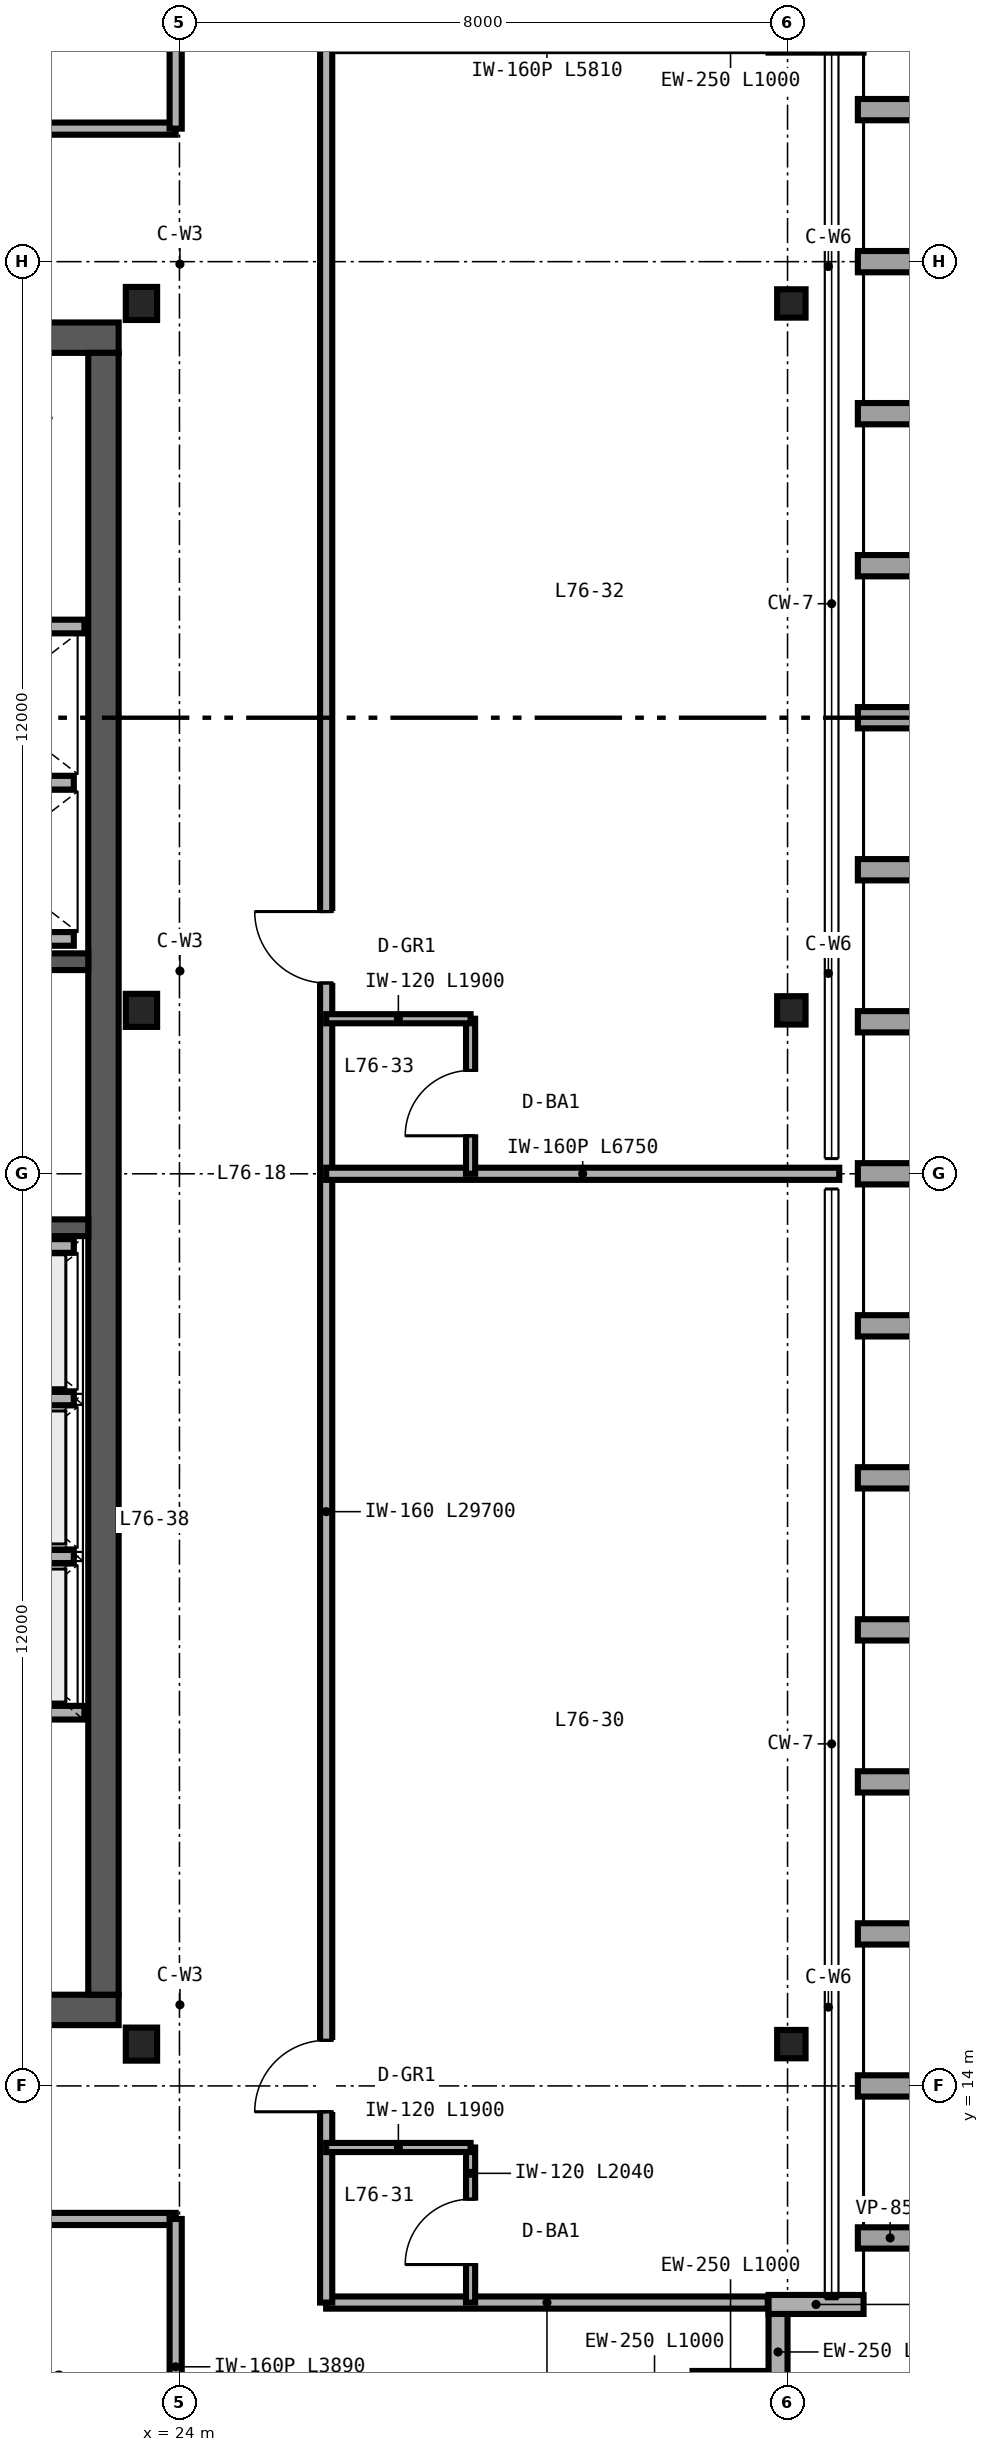
"""IFC4 building model, lengths in metres.
Left out: names, types, materials, properties, quantities, classifications, styles, units other than length and angle.
Written with IfcOpenShell. Run it as: python <this file> out.ifc"""

import sys

from ifc_helpers import new_model, si_unit, direction, frame, frame_2d, origin, origin_2d, place, context, subcontext, project, spatial, rectangle, i_section, extrude, source, transform, mapped, element, fill, save


model = new_model("IFC4")
c1 = context("Model", 3, precision=1e-05, world=origin(), true_north=direction((0.0, 1.0)))
c2 = subcontext(c1, "Body", "Model", "MODEL_VIEW")
j1 = project(units=[si_unit("LENGTHUNIT", "METRE"), si_unit("PLANEANGLEUNIT", "RADIAN")], contexts=[c1])
p1 = place(None, origin())
s1 = spatial("IfcSite", under=j1, at=p1, CompositionType="ELEMENT")
p2 = place(p1, origin())
s2 = spatial("IfcBuilding", under=s1, at=p2, CompositionType="ELEMENT")
p3 = place(p2, frame((0.0, 0.0, 297.6)))
s3 = spatial("IfcBuildingStorey", under=s2, at=p3, CompositionType="ELEMENT", Elevation=297.6)
p4 = place(p3, frame((10.8, 15.0, 0.0), z_axis=(0.0, 0.0, 1.0), x_axis=(1.0, 0.0, 0.0)))
e1 = element("IfcWall", 1, at=p4, inside=s3, PredefinedType="SHEAR", context=c2, shape_type="SweptSolid", body=[
    extrude(rectangle(XDim=12.4, YDim=0.4, at=frame_2d((6.2, 0.0))), origin(), (0.0, 0.0, 1.0), 3.32),
])
p5 = place(p4, frame((10.1, 0.0, 0.0)))
e2 = element("IfcOpeningElement", 2, at=p5, cuts=e1, PredefinedType="OPENING", context=c2, shape_type="SweptSolid", body=[
    extrude(rectangle(XDim=1.0, YDim=2.15, at=frame_2d((0.5, 1.075))), frame((0.0, 0.21, 0.0), z_axis=(0.0, -1.0, 0.0), x_axis=(1.0, 0.0, 0.0)), (0.0, 0.0, 1.0), 0.42),
])
p6 = place(p3, frame((10.8, 37.0, 0.0), z_axis=(0.0, 0.0, 1.0), x_axis=(1.0, 0.0, 0.0)))
e3 = element("IfcWall", 3, at=p6, inside=s3, PredefinedType="SHEAR", context=c2, shape_type="SweptSolid", body=[
    extrude(rectangle(XDim=12.4, YDim=0.4, at=frame_2d((6.2, 0.0))), origin(), (0.0, 0.0, 1.0), 3.32),
])
p7 = place(p6, frame((8.78, 0.0, 0.0)))
e4 = element("IfcOpeningElement", 4, at=p7, cuts=e3, PredefinedType="OPENING", context=c2, shape_type="SweptSolid", body=[
    extrude(rectangle(XDim=1.0, YDim=2.15, at=frame_2d((0.5, 1.075))), frame((0.0, 0.21, 0.0), z_axis=(0.0, -1.0, 0.0), x_axis=(1.0, 0.0, 0.0)), (0.0, 0.0, 1.0), 0.42),
])
p8 = place(p3, frame((23.0, 15.2, 0.0), z_axis=(0.0, 0.0, 1.0), x_axis=(0.0, 1.0, 0.0)))
e5 = element("IfcWall", 5, at=p8, inside=s3, PredefinedType="SHEAR", context=c2, shape_type="SweptSolid", body=[
    extrude(rectangle(XDim=21.6, YDim=0.4, at=frame_2d((10.8, 0.0))), origin(), (0.0, 0.0, 1.0), 3.32),
])
p9 = place(p3, frame((14.18, 25.29, 0.0), z_axis=(0.0, 0.0, 1.0), x_axis=(1.0, 0.0, 0.0)))
e6 = element("IfcWall", 6, at=p9, inside=s3, PredefinedType="SHEAR", context=c2, shape_type="SweptSolid", body=[
    extrude(rectangle(XDim=8.62, YDim=0.22, at=frame_2d((4.31, 0.0))), origin(), (0.0, 0.0, 1.0), 3.4),
])
p10 = place(p9, frame((0.47, 0.0, 0.0)))
e7 = element("IfcOpeningElement", 7, at=p10, cuts=e6, PredefinedType="OPENING", context=c2, shape_type="SweptSolid", body=[
    extrude(rectangle(XDim=1.05, YDim=2.15, at=frame_2d((0.525, 1.075))), frame((0.0, 0.12, 0.0), z_axis=(0.0, -1.0, 0.0), x_axis=(1.0, 0.0, 0.0)), (0.0, 0.0, 1.0), 0.24),
])
p11 = place(p3, frame((14.18, 28.79, 0.0), z_axis=(0.0, 0.0, 1.0), x_axis=(1.0, 0.0, 0.0)))
e8 = element("IfcWall", 8, at=p11, inside=s3, PredefinedType="SHEAR", context=c2, shape_type="SweptSolid", body=[
    extrude(rectangle(XDim=8.62, YDim=0.22, at=frame_2d((4.31, 0.0))), origin(), (0.0, 0.0, 1.0), 3.4),
])
m1 = source(origin(), c2, "Body", "SweptSolid", [
    extrude(i_section(OverallWidth=0.412, OverallDepth=0.435, WebThickness=0.036, FlangeThickness=0.057, FilletRadius=0.025, at=origin_2d()), origin(), (0.0, 0.0, 1.0), 3.32),
])
for number, where, z_axis, x_axis in (
    (9, (23.5, 14.55, 0.0), (0.0, 0.0, 1.0), (1.0, 0.0, 0.0)),
    (10, (23.5, 28.15, 0.0), (0.0, 0.0, 1.0), (1.0, 0.0, 0.0)),
    (11, (23.5, 37.45, 0.0), (0.0, 0.0, 1.0), (1.0, 0.0, 0.0)),
):
    element("IfcColumn", number, at=place(p3, frame(where, z_axis=z_axis, x_axis=x_axis)), inside=s3, PredefinedType="COLUMN", context=c2, shape_type="MappedRepresentation", body=[
        mapped(m1, transform((0.0, 0.0, 0.0), scale=1.0)),
    ])
m2 = source(origin(), c2, "Body", "SweptSolid", [
    extrude(i_section(OverallWidth=0.374, OverallDepth=0.373, WebThickness=0.016, FlangeThickness=0.026, FilletRadius=0.025, at=origin_2d()), origin(), (0.0, 0.0, 1.0), 3.32),
])
for number, where, z_axis, x_axis in (
    (12, (32.05, 14.55, 0.0), (0.0, 0.0, 1.0), (1.0, 0.0, 0.0)),
    (13, (32.05, 28.15, 0.0), (0.0, 0.0, 1.0), (1.0, 0.0, 0.0)),
    (14, (32.05, 37.45, 0.0), (0.0, 0.0, 1.0), (1.0, 0.0, 0.0)),
):
    element("IfcColumn", number, at=place(p3, frame(where, z_axis=z_axis, x_axis=x_axis)), inside=s3, PredefinedType="COLUMN", context=c2, shape_type="MappedRepresentation", body=[
        mapped(m2, transform((0.0, 0.0, 0.0), scale=1.0)),
    ])
for number, where, z_axis, x_axis in (
    (15, (30.75, 10.125, 0.0), (0.0, 0.0, 1.0), (1.0, 0.0, 0.0)),
    (16, (31.875, 10.0, 0.0), (0.0, 0.0, 1.0), (0.0, 1.0, 0.0)),
):
    element("IfcWall", number, at=place(p3, frame(where, z_axis=z_axis, x_axis=x_axis)), inside=s3, PredefinedType="SOLIDWALL", context=c2, shape_type="SweptSolid", body=[
        extrude(rectangle(XDim=1.0, YDim=0.25, at=frame_2d((0.5, 0.0))), origin(), (0.0, 0.0, 1.0), 3.32),
    ])
p12 = place(p3, frame((31.75, 11.125, 0.0), z_axis=(0.0, 0.0, 1.0), x_axis=(1.0, 0.0, 0.0)))
e17 = element("IfcWall", 17, at=p12, inside=s3, PredefinedType="SOLIDWALL", context=c2, shape_type="SweptSolid", body=[
    extrude(rectangle(XDim=1.25, YDim=0.25, at=frame_2d((0.625, 0.0))), origin(), (0.0, 0.0, 1.0), 3.32),
])
p13 = place(p3, frame((20.12, 18.91, 0.0), z_axis=(0.0, 0.0, 1.0), x_axis=(1.0, 0.0, 0.0)))
e18 = element("IfcWall", 18, at=p13, inside=s3, PredefinedType="SOLIDWALL", context=c2, shape_type="SweptSolid", body=[
    extrude(rectangle(XDim=2.63, YDim=0.18, at=frame_2d((1.315, 0.0))), origin(), (0.0, 0.0, 1.0), 3.32),
])
p14 = place(p3, frame((20.25, 25.05, 0.0), z_axis=(0.0, 0.0, 1.0), x_axis=(1.0, 0.0, 0.0)))
e19 = element("IfcWall", 19, at=p14, inside=s3, PredefinedType="SOLIDWALL", context=c2, shape_type="SweptSolid", body=[
    extrude(rectangle(XDim=2.36, YDim=0.18, at=frame_2d((1.18, 0.0))), origin(), (0.0, 0.0, 1.0), 3.32),
])
p15 = place(p3, frame((20.25, 20.965, 0.0), z_axis=(0.0, 0.0, 1.0), x_axis=(1.0, 0.0, 0.0)))
e20 = element("IfcWall", 20, at=p15, inside=s3, PredefinedType="SOLIDWALL", context=c2, shape_type="SweptSolid", body=[
    extrude(rectangle(XDim=2.36, YDim=0.18, at=frame_2d((1.18, 0.0))), origin(), (0.0, 0.0, 1.0), 2.42),
])
for number, where, z_axis, x_axis in (
    (21, (20.25, 23.045, 0.0), (0.0, 0.0, 1.0), (1.0, 0.0, 0.0)),
    (22, (20.25, 29.09, 0.0), (0.0, 0.0, 1.0), (1.0, 0.0, 0.0)),
):
    element("IfcWall", number, at=place(p3, frame(where, z_axis=z_axis, x_axis=x_axis)), inside=s3, PredefinedType="SOLIDWALL", context=c2, shape_type="SweptSolid", body=[
        extrude(rectangle(XDim=2.36, YDim=0.18, at=frame_2d((1.18, 0.0))), origin(), (0.0, 0.0, 1.0), 3.32),
    ])
p16 = place(p3, frame((20.25, 33.2, 0.0), z_axis=(0.0, 0.0, 1.0), x_axis=(1.0, 0.0, 0.0)))
e23 = element("IfcWall", 23, at=p16, inside=s3, PredefinedType="SOLIDWALL", context=c2, shape_type="SweptSolid", body=[
    extrude(rectangle(XDim=2.5, YDim=0.18, at=frame_2d((1.25, 0.0))), origin(), (0.0, 0.0, 1.0), 3.32),
])
p17 = place(p3, frame((20.25, 31.145, 0.0), z_axis=(0.0, 0.0, 1.0), x_axis=(1.0, 0.0, 0.0)))
e24 = element("IfcWall", 24, at=p17, inside=s3, PredefinedType="SOLIDWALL", context=c2, shape_type="SweptSolid", body=[
    extrude(rectangle(XDim=2.36, YDim=0.18, at=frame_2d((1.18, 0.0))), origin(), (0.0, 0.0, 1.0), 3.32),
])
p18 = place(p3, frame((11.2, 12.25, 0.0), z_axis=(0.0, 0.0, 1.0), x_axis=(1.0, 0.0, 0.0)))
e25 = element("IfcWall", 25, at=p18, inside=s3, PredefinedType="PARTITIONING", context=c2, shape_type="SweptSolid", body=[
    extrude(rectangle(XDim=12.75, YDim=0.16, at=frame_2d((6.375, 0.0))), origin(), (0.0, 0.0, 1.0), 3.32),
])
p19 = place(p18, frame((2.72, 0.0, 0.0)))
e26 = element("IfcOpeningElement", 26, at=p19, cuts=e25, PredefinedType="OPENING", context=c2, shape_type="SweptSolid", body=[
    extrude(rectangle(XDim=0.96, YDim=2.15, at=frame_2d((0.48, 1.075))), frame((0.0, 0.09, 0.0), z_axis=(0.0, -1.0, 0.0), x_axis=(1.0, 0.0, 0.0)), (0.0, 0.0, 1.0), 0.18),
])
p20 = place(p18, frame((9.095, 0.0, 0.0)))
e27 = element("IfcOpeningElement", 27, at=p20, cuts=e25, PredefinedType="OPENING", context=c2, shape_type="SweptSolid", body=[
    extrude(rectangle(XDim=0.96, YDim=2.15, at=frame_2d((0.48, 1.075))), frame((0.0, 0.09, 0.0), z_axis=(0.0, -1.0, 0.0), x_axis=(1.0, 0.0, 0.0)), (0.0, 0.0, 1.0), 0.18),
])
p21 = place(p3, frame((23.95, 8.36, 0.0), z_axis=(0.0, 0.0, 1.0), x_axis=(0.0, 1.0, 0.0)))
e28 = element("IfcWall", 28, at=p21, inside=s3, PredefinedType="PARTITIONING", context=c2, shape_type="SweptSolid", body=[
    extrude(rectangle(XDim=3.89, YDim=0.16, at=frame_2d((1.945, 0.0))), origin(), (0.0, 0.0, 1.0), 3.32),
])
p22 = place(p3, frame((11.2, 39.75, 0.0), z_axis=(0.0, 0.0, 1.0), x_axis=(1.0, 0.0, 0.0)))
e29 = element("IfcWall", 29, at=p22, inside=s3, PredefinedType="PARTITIONING", context=c2, shape_type="SweptSolid", body=[
    extrude(rectangle(XDim=12.75, YDim=0.16, at=frame_2d((6.375, 0.0))), origin(), (0.0, 0.0, 1.0), 3.32),
])
p23 = place(p22, frame((2.72, 0.0, 0.0)))
e30 = element("IfcOpeningElement", 30, at=p23, cuts=e29, PredefinedType="OPENING", context=c2, shape_type="SweptSolid", body=[
    extrude(rectangle(XDim=0.96, YDim=2.15, at=frame_2d((0.48, 1.075))), frame((0.0, 0.09, 0.0), z_axis=(0.0, -1.0, 0.0), x_axis=(1.0, 0.0, 0.0)), (0.0, 0.0, 1.0), 0.18),
])
p24 = place(p22, frame((9.095, 0.0, 0.0)))
e31 = element("IfcOpeningElement", 31, at=p24, cuts=e29, PredefinedType="OPENING", context=c2, shape_type="SweptSolid", body=[
    extrude(rectangle(XDim=0.96, YDim=2.15, at=frame_2d((0.48, 1.075))), frame((0.0, 0.09, 0.0), z_axis=(0.0, -1.0, 0.0), x_axis=(1.0, 0.0, 0.0)), (0.0, 0.0, 1.0), 0.18),
])
p25 = place(p3, frame((23.95, 39.75, 0.0), z_axis=(0.0, 0.0, 1.0), x_axis=(0.0, 1.0, 0.0)))
e32 = element("IfcWall", 32, at=p25, inside=s3, PredefinedType="PARTITIONING", context=c2, shape_type="SweptSolid", body=[
    extrude(rectangle(XDim=3.89, YDim=0.16, at=frame_2d((1.945, 0.0))), origin(), (0.0, 0.0, 1.0), 3.32),
])
p26 = place(p3, frame((25.93, 11.15, 0.0), z_axis=(0.0, 0.0, 1.0), x_axis=(1.0, 0.0, 0.0)))
e33 = element("IfcWall", 33, at=p26, inside=s3, PredefinedType="PARTITIONING", context=c2, shape_type="SweptSolid", body=[
    extrude(rectangle(XDim=5.81, YDim=0.16, at=frame_2d((2.905, 0.0))), origin(), (0.0, 0.0, 1.0), 3.32),
])
p27 = place(p3, frame((25.93, 11.15, 0.0), z_axis=(0.0, 0.0, 1.0), x_axis=(0.0, 1.0, 0.0)))
e34 = element("IfcWall", 34, at=p27, inside=s3, PredefinedType="PARTITIONING", context=c2, shape_type="SweptSolid", body=[
    extrude(rectangle(XDim=29.7, YDim=0.16, at=frame_2d((14.85, 0.0))), origin(), (0.0, 0.0, 1.0), 2.464),
])
p28 = place(p27, frame((2.51, 0.0, 0.0)))
e35 = element("IfcOpeningElement", 35, at=p28, cuts=e34, PredefinedType="OPENING", context=c2, shape_type="SweptSolid", body=[
    extrude(rectangle(XDim=0.94, YDim=2.15, at=frame_2d((0.47, 1.075))), frame((0.0, 0.09, 0.0), z_axis=(0.0, -1.0, 0.0), x_axis=(1.0, 0.0, 0.0)), (0.0, 0.0, 1.0), 0.18),
])
p29 = place(p27, frame((17.36, 0.0, 0.0)))
e36 = element("IfcOpeningElement", 36, at=p29, cuts=e34, PredefinedType="OPENING", context=c2, shape_type="SweptSolid", body=[
    extrude(rectangle(XDim=0.94, YDim=2.15, at=frame_2d((0.47, 1.075))), frame((0.0, 0.09, 0.0), z_axis=(0.0, -1.0, 0.0), x_axis=(1.0, 0.0, 0.0)), (0.0, 0.0, 1.0), 0.18),
])
p30 = place(p3, frame((25.93, 26.0, 0.0), z_axis=(0.0, 0.0, 1.0), x_axis=(1.0, 0.0, 0.0)))
e37 = element("IfcWall", 37, at=p30, inside=s3, PredefinedType="PARTITIONING", context=c2, shape_type="SweptSolid", body=[
    extrude(rectangle(XDim=6.75, YDim=0.16, at=frame_2d((3.375, 0.0))), origin(), (0.0, 0.0, 1.0), 2.541),
])
p31 = place(p3, frame((27.83, 11.15, 0.0), z_axis=(0.0, 0.0, 1.0), x_axis=(0.0, 1.0, 0.0)))
e38 = element("IfcWall", 38, at=p31, inside=s3, PredefinedType="PARTITIONING", context=c2, shape_type="SweptSolid", body=[
    extrude(rectangle(XDim=2.04, YDim=0.12, at=frame_2d((1.02, 0.0))), origin(), (0.0, 0.0, 1.0), 3.32),
])
p32 = place(p31, frame((0.5, 0.0, 0.0)))
e39 = element("IfcOpeningElement", 39, at=p32, cuts=e38, PredefinedType="OPENING", context=c2, shape_type="SweptSolid", body=[
    extrude(rectangle(XDim=0.86, YDim=2.1, at=frame_2d((0.43, 1.05))), frame((0.0, 0.07, 0.0), z_axis=(0.0, -1.0, 0.0), x_axis=(1.0, 0.0, 0.0)), (0.0, 0.0, 1.0), 0.14),
])
p33 = place(p3, frame((25.93, 13.19, 0.0), z_axis=(0.0, 0.0, 1.0), x_axis=(1.0, 0.0, 0.0)))
e40 = element("IfcWall", 40, at=p33, inside=s3, PredefinedType="PARTITIONING", context=c2, shape_type="SweptSolid", body=[
    extrude(rectangle(XDim=1.9, YDim=0.12, at=frame_2d((0.95, 0.0))), origin(), (0.0, 0.0, 1.0), 3.32),
])
p34 = place(p3, frame((27.83, 26.0, 0.0), z_axis=(0.0, 0.0, 1.0), x_axis=(0.0, 1.0, 0.0)))
e41 = element("IfcWall", 41, at=p34, inside=s3, PredefinedType="PARTITIONING", context=c2, shape_type="SweptSolid", body=[
    extrude(rectangle(XDim=2.04, YDim=0.12, at=frame_2d((1.02, 0.0))), origin(), (0.0, 0.0, 1.0), 2.464),
])
p35 = place(p34, frame((0.5, 0.0, 0.0)))
e42 = element("IfcOpeningElement", 42, at=p35, cuts=e41, PredefinedType="OPENING", context=c2, shape_type="SweptSolid", body=[
    extrude(rectangle(XDim=0.86, YDim=2.1, at=frame_2d((0.43, 1.05))), frame((0.0, 0.07, 0.0), z_axis=(0.0, -1.0, 0.0), x_axis=(1.0, 0.0, 0.0)), (0.0, 0.0, 1.0), 0.14),
])
p36 = place(p3, frame((25.93, 28.04, 0.0), z_axis=(0.0, 0.0, 1.0), x_axis=(1.0, 0.0, 0.0)))
e43 = element("IfcWall", 43, at=p36, inside=s3, PredefinedType="PARTITIONING", context=c2, shape_type="SweptSolid", body=[
    extrude(rectangle(XDim=1.9, YDim=0.12, at=frame_2d((0.95, 0.0))), origin(), (0.0, 0.0, 1.0), 2.464),
])
m3 = source(origin(), c2, "Body", "SweptSolid", [
    extrude(rectangle(XDim=0.86, YDim=2.1, at=frame_2d((0.43, 1.05))), frame((0.0, 0.025, 0.0), z_axis=(0.0, -1.0, 0.0), x_axis=(1.0, 0.0, 0.0)), (0.0, 0.0, 1.0), 0.05),
])
p37 = place(p32, origin())
e44 = element("IfcDoor", 44, at=p37, inside=s3, OperationType="SINGLE_SWING_LEFT", PredefinedType="DOOR", context=c2, shape_type="MappedRepresentation", body=[
    mapped(m3, transform((0.0, 0.0, 0.0), scale=1.0)),
])
fill(e39, e44)
m4 = source(origin(), c2, "Body", "SweptSolid", [
    extrude(rectangle(XDim=0.94, YDim=2.15, at=frame_2d((0.47, 1.075))), frame((0.0, 0.025, 0.0), z_axis=(0.0, -1.0, 0.0), x_axis=(1.0, 0.0, 0.0)), (0.0, 0.0, 1.0), 0.05),
])
p38 = place(p28, origin())
e45 = element("IfcDoor", 45, at=p38, inside=s3, OperationType="SINGLE_SWING_LEFT", PredefinedType="DOOR", context=c2, shape_type="MappedRepresentation", body=[
    mapped(m4, transform((0.0, 0.0, 0.0), scale=1.0)),
])
fill(e35, e45)
p39 = place(p35, origin())
e46 = element("IfcDoor", 46, at=p39, inside=s3, OperationType="SINGLE_SWING_LEFT", PredefinedType="DOOR", context=c2, shape_type="MappedRepresentation", body=[
    mapped(m3, transform((0.0, 0.0, 0.0), scale=1.0)),
])
fill(e42, e46)
p40 = place(p29, origin())
e47 = element("IfcDoor", 47, at=p40, inside=s3, OperationType="SINGLE_SWING_RIGHT", PredefinedType="DOOR", context=c2, shape_type="MappedRepresentation", body=[
    mapped(m4, transform((0.0, 0.0, 0.0), scale=1.0)),
])
fill(e36, e47)
save(model, sys.argv[1])
